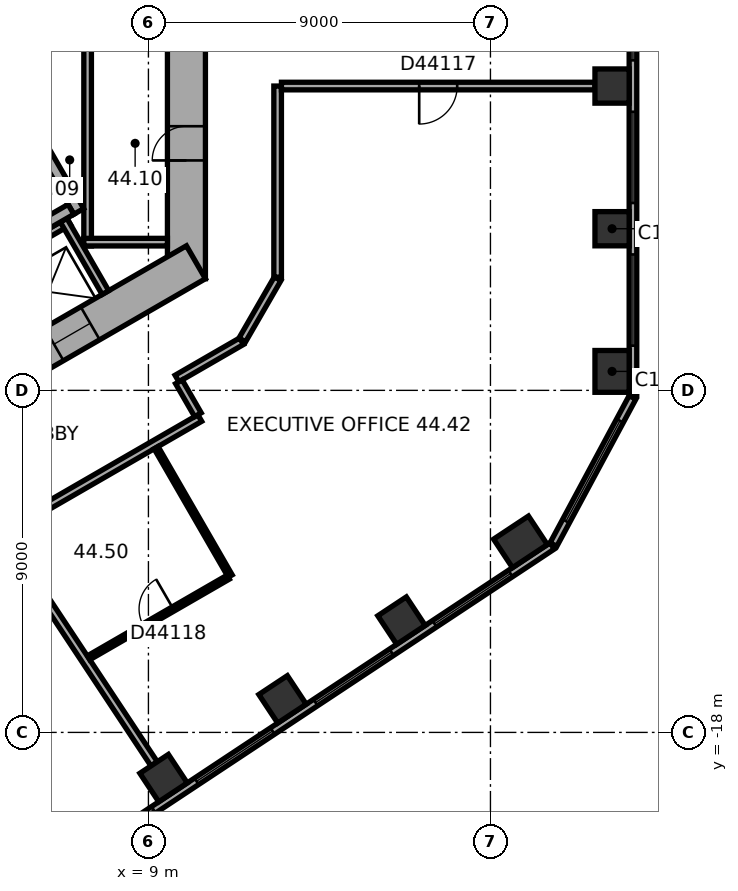
"""IFC4 building model, lengths in metres.
Left out: names, types, materials, properties, quantities, classifications, styles, units other than length and angle.
Written with IfcOpenShell. Run it as: python <this file> out.ifc"""

import sys

from ifc_helpers import new_model, si_unit, direction, frame, frame_2d, origin, origin_2d, place, context, subcontext, project, spatial, rectangle, extrude, element, fill, save


model = new_model("IFC4")
c1 = context("Model", 3, precision=1e-05, world=origin(), true_north=direction((0.0, 1.0)))
c2 = subcontext(c1, "Body", "Model", "MODEL_VIEW")
j1 = project(units=[si_unit("LENGTHUNIT", "METRE"), si_unit("PLANEANGLEUNIT", "RADIAN")], contexts=[c1])
p1 = place(None, origin())
s1 = spatial("IfcSite", under=j1, at=p1, CompositionType="ELEMENT")
p2 = place(p1, origin())
s2 = spatial("IfcBuilding", under=s1, at=p2, CompositionType="ELEMENT")
p3 = place(p2, frame((0.0, 0.0, 179.9)))
s3 = spatial("IfcBuildingStorey", under=s2, at=p3, CompositionType="ELEMENT", Elevation=179.9)
p4 = place(p3, frame((21.2, -8.501, 0.0), z_axis=(0.0, 0.0, 1.0), x_axis=(0.0, 1.0, 0.0)))
e1 = element("IfcColumn", 1, at=p4, inside=s3, PredefinedType="COLUMN", context=c2, shape_type="SweptSolid", body=[
    extrude(rectangle(XDim=1.1, YDim=0.9, at=origin_2d()), origin(), (0.0, 0.0, 1.0), 3.7),
])
for number, where, z_axis, x_axis in (
    (2, (21.2, -4.747, 0.0), (0.0, 0.0, 1.0), (0.0, 1.0, 0.0)),
    (3, (21.2, -0.993, 0.0), (0.0, 0.0, 1.0), (0.0, 1.0, 0.0)),
    (4, (9.398, -19.202, 0.0), (0.0, 0.0, 1.0), (0.834, 0.552, 0.0)),
    (5, (12.529, -17.13, 0.0), (0.0, 0.0, 1.0), (0.834, 0.552, 0.0)),
    (6, (15.659, -15.058, 0.0), (0.0, 0.0, 1.0), (0.834, 0.552, 0.0)),
):
    element("IfcColumn", number, at=place(p3, frame(where, z_axis=z_axis, x_axis=x_axis)), inside=s3, PredefinedType="COLUMN", context=c2, shape_type="SweptSolid", body=[
        extrude(rectangle(XDim=0.9, YDim=0.9, at=origin_2d()), origin(), (0.0, 0.0, 1.0), 3.7),
    ])
p5 = place(p3, frame((18.79, -12.986, 0.0), z_axis=(0.0, 0.0, 1.0), x_axis=(0.833885822067, 0.551936985312, 0.0)))
e7 = element("IfcColumn", 7, at=p5, inside=s3, PredefinedType="COLUMN", context=c2, shape_type="SweptSolid", body=[
    extrude(rectangle(XDim=1.1, YDim=0.9, at=origin_2d()), origin(), (0.0, 0.0, 1.0), 3.7),
])
p6 = place(p3, frame((10.0, -6.062, 0.0), z_axis=(0.0, 0.0, 1.0), x_axis=(0.0, 1.0, 0.0)))
e8 = element("IfcWall", 8, at=p6, inside=s3, PredefinedType="SHEAR", context=c2, shape_type="SweptSolid", body=[
    extrude(rectangle(XDim=12.125, YDim=1.0, at=frame_2d((6.062, 0.0))), origin(), (0.0, 0.0, 1.0), 3.7),
])
p7 = place(p6, frame((6.262, 0.0, 0.0)))
e9 = element("IfcOpeningElement", 9, at=p7, cuts=e8, PredefinedType="OPENING", context=c2, shape_type="SweptSolid", body=[
    extrude(rectangle(XDim=1.5, YDim=2.1, at=frame_2d((0.75, 1.05))), frame((0.0, 0.51, 0.0), z_axis=(0.0, -1.0, 0.0), x_axis=(1.0, 0.0, 0.0)), (0.0, 0.0, 1.0), 1.02),
])
p8 = place(p6, frame((3.112, 0.0, 0.0)))
e10 = element("IfcOpeningElement", 10, at=p8, cuts=e8, PredefinedType="OPENING", context=c2, shape_type="SweptSolid", body=[
    extrude(rectangle(XDim=0.9, YDim=2.1, at=frame_2d((0.45, 1.05))), frame((0.0, 0.51, 0.0), z_axis=(0.0, -1.0, 0.0), x_axis=(1.0, 0.0, 0.0)), (0.0, 0.0, 1.0), 1.02),
])
p9 = place(p3, frame((-0.25, -11.691, 0.0), z_axis=(0.0, 0.0, 1.0), x_axis=(0.866022616891, 0.50000482701, 0.0)))
e11 = element("IfcWall", 11, at=p9, inside=s3, PredefinedType="SHEAR", context=c2, shape_type="SweptSolid", body=[
    extrude(rectangle(XDim=12.125, YDim=1.0, at=frame_2d((6.062, 0.0))), origin(), (0.0, 0.0, 1.0), 3.7),
])
p10 = place(p9, frame((2.612, 0.0, 0.0)))
e12 = element("IfcOpeningElement", 12, at=p10, cuts=e11, PredefinedType="OPENING", context=c2, shape_type="SweptSolid", body=[
    extrude(rectangle(XDim=1.1, YDim=2.1, at=frame_2d((0.55, 1.05))), frame((0.0, 0.51, 0.0), z_axis=(0.0, -1.0, 0.0), x_axis=(1.0, 0.0, 0.0)), (0.0, 0.0, 1.0), 1.02),
])
p11 = place(p9, frame((5.212, 0.0, 0.0)))
e13 = element("IfcOpeningElement", 13, at=p11, cuts=e11, PredefinedType="OPENING", context=c2, shape_type="SweptSolid", body=[
    extrude(rectangle(XDim=1.1, YDim=2.1, at=frame_2d((0.55, 1.05))), frame((0.0, 0.51, 0.0), z_axis=(0.0, -1.0, 0.0), x_axis=(1.0, 0.0, 0.0)), (0.0, 0.0, 1.0), 1.02),
])
p12 = place(p9, frame((7.812, 0.0, 0.0)))
e14 = element("IfcOpeningElement", 14, at=p12, cuts=e11, PredefinedType="OPENING", context=c2, shape_type="SweptSolid", body=[
    extrude(rectangle(XDim=1.1, YDim=2.1, at=frame_2d((0.55, 1.05))), frame((0.0, 0.51, 0.0), z_axis=(0.0, -1.0, 0.0), x_axis=(1.0, 0.0, 0.0)), (0.0, 0.0, 1.0), 1.02),
])
p13 = place(p3, frame((21.75, -9.138, 0.0), z_axis=(0.0, 0.0, 1.0), x_axis=(0.0, 1.0, 0.0)))
e15 = element("IfcWall", 15, at=p13, inside=s3, PredefinedType="STANDARD", context=c2, shape_type="SweptSolid", body=[
    extrude(rectangle(XDim=20.044, YDim=0.2, at=frame_2d((10.022, 0.0))), origin(), (0.0, 0.0, 1.0), 3.7),
])
p14 = place(p13, frame((1.314, 0.0, 0.9)))
e16 = element("IfcOpeningElement", 16, at=p14, cuts=e15, PredefinedType="OPENING", context=c2, shape_type="SweptSolid", body=[
    extrude(rectangle(XDim=2.4, YDim=2.0, at=frame_2d((1.2, 1.0))), frame((0.0, 0.11, 0.0), z_axis=(0.0, -1.0, 0.0), x_axis=(1.0, 0.0, 0.0)), (0.0, 0.0, 1.0), 0.22),
])
p15 = place(p13, frame((5.069, 0.0, 0.9)))
e17 = element("IfcOpeningElement", 17, at=p15, cuts=e15, PredefinedType="OPENING", context=c2, shape_type="SweptSolid", body=[
    extrude(rectangle(XDim=2.4, YDim=2.0, at=frame_2d((1.2, 1.0))), frame((0.0, 0.11, 0.0), z_axis=(0.0, -1.0, 0.0), x_axis=(1.0, 0.0, 0.0)), (0.0, 0.0, 1.0), 0.22),
])
p16 = place(p13, frame((8.823, 0.0, 0.9)))
e18 = element("IfcOpeningElement", 18, at=p16, cuts=e15, PredefinedType="OPENING", context=c2, shape_type="SweptSolid", body=[
    extrude(rectangle(XDim=2.4, YDim=2.0, at=frame_2d((1.2, 1.0))), frame((0.0, 0.11, 0.0), z_axis=(0.0, -1.0, 0.0), x_axis=(1.0, 0.0, 0.0)), (0.0, 0.0, 1.0), 0.22),
])
p17 = place(p13, frame((12.577, 0.0, 0.9)))
e19 = element("IfcOpeningElement", 19, at=p17, cuts=e15, PredefinedType="OPENING", context=c2, shape_type="SweptSolid", body=[
    extrude(rectangle(XDim=2.4, YDim=2.0, at=frame_2d((1.2, 1.0))), frame((0.0, 0.11, 0.0), z_axis=(0.0, -1.0, 0.0), x_axis=(1.0, 0.0, 0.0)), (0.0, 0.0, 1.0), 0.22),
])
p18 = place(p13, frame((16.331, 0.0, 0.9)))
e20 = element("IfcOpeningElement", 20, at=p18, cuts=e15, PredefinedType="OPENING", context=c2, shape_type="SweptSolid", body=[
    extrude(rectangle(XDim=2.4, YDim=2.0, at=frame_2d((1.2, 1.0))), frame((0.0, 0.11, 0.0), z_axis=(0.0, -1.0, 0.0), x_axis=(1.0, 0.0, 0.0)), (0.0, 0.0, 1.0), 0.22),
])
p19 = place(p3, frame((2.911, -24.156, 0.0), z_axis=(0.0, 0.0, 1.0), x_axis=(0.833882163564, 0.551942512668, 0.0)))
e21 = element("IfcWall", 21, at=p19, inside=s3, PredefinedType="STANDARD", context=c2, shape_type="SweptSolid", body=[
    extrude(rectangle(XDim=20.044, YDim=0.2, at=frame_2d((10.022, 0.0))), origin(), (0.0, 0.0, 1.0), 3.7),
])
p20 = place(p19, frame((1.313, 0.0, 0.9)))
e22 = element("IfcOpeningElement", 22, at=p20, cuts=e21, PredefinedType="OPENING", context=c2, shape_type="SweptSolid", body=[
    extrude(rectangle(XDim=2.4, YDim=2.0, at=frame_2d((1.2, 1.0))), frame((0.0, 0.11, 0.0), z_axis=(0.0, -1.0, 0.0), x_axis=(1.0, 0.0, 0.0)), (0.0, 0.0, 1.0), 0.22),
])
p21 = place(p19, frame((5.067, 0.0, 0.9)))
e23 = element("IfcOpeningElement", 23, at=p21, cuts=e21, PredefinedType="OPENING", context=c2, shape_type="SweptSolid", body=[
    extrude(rectangle(XDim=2.4, YDim=2.0, at=frame_2d((1.2, 1.0))), frame((0.0, 0.11, 0.0), z_axis=(0.0, -1.0, 0.0), x_axis=(1.0, 0.0, 0.0)), (0.0, 0.0, 1.0), 0.22),
])
p22 = place(p19, frame((8.821, 0.0, 0.9)))
e24 = element("IfcOpeningElement", 24, at=p22, cuts=e21, PredefinedType="OPENING", context=c2, shape_type="SweptSolid", body=[
    extrude(rectangle(XDim=2.4, YDim=2.0, at=frame_2d((1.2, 1.0))), frame((0.0, 0.11, 0.0), z_axis=(0.0, -1.0, 0.0), x_axis=(1.0, 0.0, 0.0)), (0.0, 0.0, 1.0), 0.22),
])
p23 = place(p19, frame((12.575, 0.0, 0.9)))
e25 = element("IfcOpeningElement", 25, at=p23, cuts=e21, PredefinedType="OPENING", context=c2, shape_type="SweptSolid", body=[
    extrude(rectangle(XDim=2.4, YDim=2.0, at=frame_2d((1.2, 1.0))), frame((0.0, 0.11, 0.0), z_axis=(0.0, -1.0, 0.0), x_axis=(1.0, 0.0, 0.0)), (0.0, 0.0, 1.0), 0.22),
])
p24 = place(p19, frame((16.329, 0.0, 0.9)))
e26 = element("IfcOpeningElement", 26, at=p24, cuts=e21, PredefinedType="OPENING", context=c2, shape_type="SweptSolid", body=[
    extrude(rectangle(XDim=2.4, YDim=2.0, at=frame_2d((1.2, 1.0))), frame((0.0, 0.11, 0.0), z_axis=(0.0, -1.0, 0.0), x_axis=(1.0, 0.0, 0.0)), (0.0, 0.0, 1.0), 0.22),
])
p25 = place(p3, frame((19.658, -13.057, 0.0), z_axis=(0.0, 0.0, 1.0), x_axis=(0.473307879841, 0.880897071672, 0.0)))
e27 = element("IfcWall", 27, at=p25, inside=s3, PredefinedType="STANDARD", context=c2, shape_type="SweptSolid", body=[
    extrude(rectangle(XDim=4.395, YDim=0.2, at=frame_2d((2.197, 0.0))), origin(), (0.0, 0.0, 1.0), 3.7),
])
p26 = place(p25, frame((0.698, 0.0, 0.9)))
e28 = element("IfcOpeningElement", 28, at=p26, cuts=e27, PredefinedType="OPENING", context=c2, shape_type="SweptSolid", body=[
    extrude(rectangle(XDim=3.0, YDim=2.0, at=frame_2d((1.5, 1.0))), frame((0.0, 0.11, 0.0), z_axis=(0.0, -1.0, 0.0), x_axis=(1.0, 0.0, 0.0)), (0.0, 0.0, 1.0), 0.22),
])
p27 = place(p3, frame((7.4, -5.2, 0.0), z_axis=(0.0, 0.0, 1.0), x_axis=(0.0, 1.0, 0.0)))
e29 = element("IfcWall", 29, at=p27, inside=s3, PredefinedType="PARTITIONING", context=c2, shape_type="SweptSolid", body=[
    extrude(rectangle(XDim=5.4, YDim=0.2, at=frame_2d((2.7, 0.0))), origin(), (0.0, 0.0, 1.0), 3.42),
])
p28 = place(p3, frame((7.3, -5.1, 0.0), z_axis=(0.0, 0.0, 1.0), x_axis=(1.0, 0.0, 0.0)))
e30 = element("IfcWall", 30, at=p28, inside=s3, PredefinedType="PARTITIONING", context=c2, shape_type="SweptSolid", body=[
    extrude(rectangle(XDim=2.2, YDim=0.2, at=frame_2d((1.1, 0.0))), origin(), (0.0, 0.0, 1.0), 3.42),
])
p29 = place(p3, frame((-0.024, -8.559, 0.0), z_axis=(0.0, 0.0, 1.0), x_axis=(0.866026010844, 0.49999894854, 0.0)))
e31 = element("IfcWall", 31, at=p29, inside=s3, PredefinedType="PARTITIONING", context=c2, shape_type="SweptSolid", body=[
    extrude(rectangle(XDim=8.0, YDim=0.2, at=frame_2d((4.0, 0.0))), origin(), (0.0, 0.0, 1.0), 3.42),
])
p30 = place(p3, frame((6.768, -4.522, 0.0), z_axis=(0.0, 0.0, 1.0), x_axis=(0.50002983664, -0.866008176907, 0.0)))
e32 = element("IfcWall", 32, at=p30, inside=s3, PredefinedType="PARTITIONING", context=c2, shape_type="SweptSolid", body=[
    extrude(rectangle(XDim=2.2, YDim=0.2, at=frame_2d((1.1, 0.0))), origin(), (0.0, 0.0, 1.0), 3.42),
])
p31 = place(p3, frame((4.816, -0.222, 0.0), z_axis=(0.0, 0.0, 1.0), x_axis=(0.499977259774, -0.866038532462, 0.0)))
e33 = element("IfcWall", 33, at=p31, inside=s3, PredefinedType="SHEAR", context=c2, shape_type="SweptSolid", body=[
    extrude(rectangle(XDim=4.7, YDim=0.3, at=frame_2d((2.35, 0.0))), origin(), (0.0, 0.0, 1.0), 3.42),
])
p32 = place(p3, frame((0.847, -7.767, 0.0), z_axis=(0.0, 0.0, 1.0), x_axis=(0.866027801685, 0.499995846692, 0.0)))
e34 = element("IfcWall", 34, at=p32, inside=s3, PredefinedType="SHEAR", context=c2, shape_type="SweptSolid", body=[
    extrude(rectangle(XDim=7.06, YDim=0.3, at=frame_2d((3.53, 0.0))), origin(), (0.0, 0.0, 1.0), 3.42),
])
p33 = place(p3, frame((5.342, -12.621, 0.0), z_axis=(0.0, 0.0, 1.0), x_axis=(0.866024665123, 0.500001279396, 0.0)))
e35 = element("IfcWall", 35, at=p33, inside=s3, PredefinedType="PARTITIONING", context=c2, shape_type="SweptSolid", body=[
    extrude(rectangle(XDim=5.786, YDim=0.2, at=frame_2d((2.893, 0.0))), origin(), (0.0, 0.0, 1.0), 3.42),
])
p34 = place(p3, frame((9.15, -18.827, 0.0), z_axis=(0.0, 0.0, 1.0), x_axis=(-0.551939801345, 0.833883958169, 0.0)))
e36 = element("IfcWall", 36, at=p34, inside=s3, PredefinedType="PARTITIONING", context=c2, shape_type="SweptSolid", body=[
    extrude(rectangle(XDim=7.192, YDim=0.2, at=frame_2d((3.596, 0.0))), origin(), (0.0, 0.0, 1.0), 2.87),
])
p35 = place(p3, frame((9.202, -10.508, 0.0), z_axis=(0.0, 0.0, 1.0), x_axis=(0.500043961785, -0.866000020948, 0.0)))
e37 = element("IfcWall", 37, at=p35, inside=s3, PredefinedType="PARTITIONING", context=c2, shape_type="SweptSolid", body=[
    extrude(rectangle(XDim=3.9, YDim=0.12, at=frame_2d((1.95, 0.0))), origin(), (0.0, 0.0, 1.0), 3.42),
])
p36 = place(p3, frame((9.752, -8.688, 0.0), z_axis=(0.0, 0.0, 1.0), x_axis=(0.865974105138, 0.500088841337, 0.0)))
e38 = element("IfcWall", 38, at=p36, inside=s3, PredefinedType="PARTITIONING", context=c2, shape_type="SweptSolid", body=[
    extrude(rectangle(XDim=1.961, YDim=0.2, at=frame_2d((0.98, 0.0))), origin(), (0.0, 0.0, 1.0), 3.42),
])
p37 = place(p3, frame((10.302, -9.642, 0.0), z_axis=(0.0, 0.0, 1.0), x_axis=(-0.500074377092, 0.865982457891, 0.0)))
e39 = element("IfcWall", 39, at=p37, inside=s3, PredefinedType="PARTITIONING", context=c2, shape_type="SweptSolid", body=[
    extrude(rectangle(XDim=1.001, YDim=0.2, at=frame_2d((0.5, 0.0))), origin(), (0.0, 0.0, 1.0), 3.42),
])
p38 = place(p3, frame((11.1, -13.915, 0.0), z_axis=(0.0, 0.0, 1.0), x_axis=(-0.866048475386, -0.499960036685, 0.0)))
e40 = element("IfcWall", 40, at=p38, inside=s3, PredefinedType="PARTITIONING", context=c2, shape_type="SweptSolid", body=[
    extrude(rectangle(XDim=4.24, YDim=0.12, at=frame_2d((2.12, 0.0))), origin(), (0.0, 0.0, 1.0), 3.42),
])
p39 = place(p38, frame((1.67, 0.0, 0.0)))
e41 = element("IfcOpeningElement", 41, at=p39, cuts=e40, PredefinedType="OPENING", context=c2, shape_type="SweptSolid", body=[
    extrude(rectangle(XDim=0.9, YDim=2.1, at=frame_2d((0.45, 1.05))), frame((0.0, 0.07, 0.0), z_axis=(0.0, -1.0, 0.0), x_axis=(1.0, 0.0, 0.0)), (0.0, 0.0, 1.0), 0.14),
])
p40 = place(p3, frame((11.47, -7.673, 0.0), z_axis=(0.0, 0.0, 1.0), x_axis=(0.499964847546, 0.866045698112, 0.0)))
e42 = element("IfcWall", 42, at=p40, inside=s3, PredefinedType="PARTITIONING", context=c2, shape_type="SweptSolid", body=[
    extrude(rectangle(XDim=1.86, YDim=0.2, at=frame_2d((0.93, 0.0))), origin(), (0.0, 0.0, 1.0), 3.42),
])
p41 = place(p3, frame((12.4, -6.022, 0.0), z_axis=(0.0, 0.0, 1.0), x_axis=(0.0, 1.0, 0.0)))
e43 = element("IfcWall", 43, at=p41, inside=s3, PredefinedType="PARTITIONING", context=c2, shape_type="SweptSolid", body=[
    extrude(rectangle(XDim=5.029, YDim=0.2, at=frame_2d((2.515, 0.0))), origin(), (0.0, 0.0, 1.0), 3.42),
])
p42 = place(p3, frame((12.5, -0.993, 0.0), z_axis=(0.0, 0.0, 1.0), x_axis=(1.0, 0.0, 0.0)))
e44 = element("IfcWall", 44, at=p42, inside=s3, PredefinedType="PARTITIONING", context=c2, shape_type="SweptSolid", body=[
    extrude(rectangle(XDim=8.25, YDim=0.2, at=frame_2d((4.125, 0.0))), origin(), (0.0, 0.0, 1.0), 2.87),
])
p43 = place(p42, frame((3.625, 0.0, 0.0)))
e45 = element("IfcOpeningElement", 45, at=p43, cuts=e44, PredefinedType="OPENING", context=c2, shape_type="SweptSolid", body=[
    extrude(rectangle(XDim=1.0, YDim=2.1, at=frame_2d((0.5, 1.05))), frame((0.0, 0.11, 0.0), z_axis=(0.0, -1.0, 0.0), x_axis=(1.0, 0.0, 0.0)), (0.0, 0.0, 1.0), 0.22),
])
p44 = place(p14, origin())
e46 = element("IfcWindow", 46, at=p44, inside=s3, PartitioningType="SINGLE_PANEL", PredefinedType="WINDOW", context=c2, shape_type="SweptSolid", body=[
    extrude(rectangle(XDim=2.4, YDim=2.0, at=frame_2d((1.2, 1.0))), frame((0.0, 0.03, 0.0), z_axis=(0.0, -1.0, 0.0), x_axis=(1.0, 0.0, 0.0)), (0.0, 0.0, 1.0), 0.06),
])
fill(e16, e46)
p45 = place(p15, origin())
e47 = element("IfcWindow", 47, at=p45, inside=s3, PartitioningType="SINGLE_PANEL", PredefinedType="WINDOW", context=c2, shape_type="SweptSolid", body=[
    extrude(rectangle(XDim=2.4, YDim=2.0, at=frame_2d((1.2, 1.0))), frame((0.0, 0.03, 0.0), z_axis=(0.0, -1.0, 0.0), x_axis=(1.0, 0.0, 0.0)), (0.0, 0.0, 1.0), 0.06),
])
fill(e17, e47)
p46 = place(p16, origin())
e48 = element("IfcWindow", 48, at=p46, inside=s3, PartitioningType="SINGLE_PANEL", PredefinedType="WINDOW", context=c2, shape_type="SweptSolid", body=[
    extrude(rectangle(XDim=2.4, YDim=2.0, at=frame_2d((1.2, 1.0))), frame((0.0, 0.03, 0.0), z_axis=(0.0, -1.0, 0.0), x_axis=(1.0, 0.0, 0.0)), (0.0, 0.0, 1.0), 0.06),
])
fill(e18, e48)
p47 = place(p21, origin())
e49 = element("IfcWindow", 49, at=p47, inside=s3, PartitioningType="SINGLE_PANEL", PredefinedType="WINDOW", context=c2, shape_type="SweptSolid", body=[
    extrude(rectangle(XDim=2.4, YDim=2.0, at=frame_2d((1.2, 1.0))), frame((0.0, 0.03, 0.0), z_axis=(0.0, -1.0, 0.0), x_axis=(1.0, 0.0, 0.0)), (0.0, 0.0, 1.0), 0.06),
])
fill(e23, e49)
p48 = place(p22, origin())
e50 = element("IfcWindow", 50, at=p48, inside=s3, PartitioningType="SINGLE_PANEL", PredefinedType="WINDOW", context=c2, shape_type="SweptSolid", body=[
    extrude(rectangle(XDim=2.4, YDim=2.0, at=frame_2d((1.2, 1.0))), frame((0.0, 0.03, 0.0), z_axis=(0.0, -1.0, 0.0), x_axis=(1.0, 0.0, 0.0)), (0.0, 0.0, 1.0), 0.06),
])
fill(e24, e50)
p49 = place(p23, origin())
e51 = element("IfcWindow", 51, at=p49, inside=s3, PartitioningType="SINGLE_PANEL", PredefinedType="WINDOW", context=c2, shape_type="SweptSolid", body=[
    extrude(rectangle(XDim=2.4, YDim=2.0, at=frame_2d((1.2, 1.0))), frame((0.0, 0.03, 0.0), z_axis=(0.0, -1.0, 0.0), x_axis=(1.0, 0.0, 0.0)), (0.0, 0.0, 1.0), 0.06),
])
fill(e25, e51)
p50 = place(p24, origin())
e52 = element("IfcWindow", 52, at=p50, inside=s3, PartitioningType="SINGLE_PANEL", PredefinedType="WINDOW", context=c2, shape_type="SweptSolid", body=[
    extrude(rectangle(XDim=2.4, YDim=2.0, at=frame_2d((1.2, 1.0))), frame((0.0, 0.03, 0.0), z_axis=(0.0, -1.0, 0.0), x_axis=(1.0, 0.0, 0.0)), (0.0, 0.0, 1.0), 0.06),
])
fill(e26, e52)
p51 = place(p26, origin())
e53 = element("IfcWindow", 53, at=p51, inside=s3, PartitioningType="SINGLE_PANEL", PredefinedType="WINDOW", context=c2, shape_type="SweptSolid", body=[
    extrude(rectangle(XDim=3.0, YDim=2.0, at=frame_2d((1.5, 1.0))), frame((0.0, 0.03, 0.0), z_axis=(0.0, -1.0, 0.0), x_axis=(1.0, 0.0, 0.0)), (0.0, 0.0, 1.0), 0.06),
])
fill(e28, e53)
p52 = place(p8, origin())
e54 = element("IfcDoor", 54, at=p52, inside=s3, OperationType="SINGLE_SWING_LEFT", PredefinedType="DOOR", context=c2, shape_type="SweptSolid", body=[
    extrude(rectangle(XDim=0.9, YDim=2.1, at=frame_2d((0.45, 1.05))), frame((0.0, 0.025, 0.0), z_axis=(0.0, -1.0, 0.0), x_axis=(1.0, 0.0, 0.0)), (0.0, 0.0, 1.0), 0.05),
])
fill(e10, e54)
p53 = place(p12, origin())
e55 = element("IfcDoor", 55, at=p53, inside=s3, OperationType="DOUBLE_DOOR_SLIDING", PredefinedType="DOOR", context=c2, shape_type="SweptSolid", body=[
    extrude(rectangle(XDim=1.1, YDim=2.1, at=frame_2d((0.55, 1.05))), frame((0.0, 0.025, 0.0), z_axis=(0.0, -1.0, 0.0), x_axis=(1.0, 0.0, 0.0)), (0.0, 0.0, 1.0), 0.05),
])
fill(e14, e55)
p54 = place(p43, origin())
e56 = element("IfcDoor", 56, at=p54, inside=s3, OperationType="SINGLE_SWING_LEFT", PredefinedType="DOOR", context=c2, shape_type="SweptSolid", body=[
    extrude(rectangle(XDim=1.0, YDim=2.1, at=frame_2d((0.5, 1.05))), frame((0.0, 0.025, 0.0), z_axis=(0.0, -1.0, 0.0), x_axis=(1.0, 0.0, 0.0)), (0.0, 0.0, 1.0), 0.05),
])
fill(e45, e56)
p55 = place(p39, origin())
e57 = element("IfcDoor", 57, at=p55, inside=s3, OperationType="SINGLE_SWING_LEFT", PredefinedType="DOOR", context=c2, shape_type="SweptSolid", body=[
    extrude(rectangle(XDim=0.9, YDim=2.1, at=frame_2d((0.45, 1.05))), frame((0.0, 0.025, 0.0), z_axis=(0.0, -1.0, 0.0), x_axis=(1.0, 0.0, 0.0)), (0.0, 0.0, 1.0), 0.05),
])
fill(e41, e57)
save(model, sys.argv[1])
